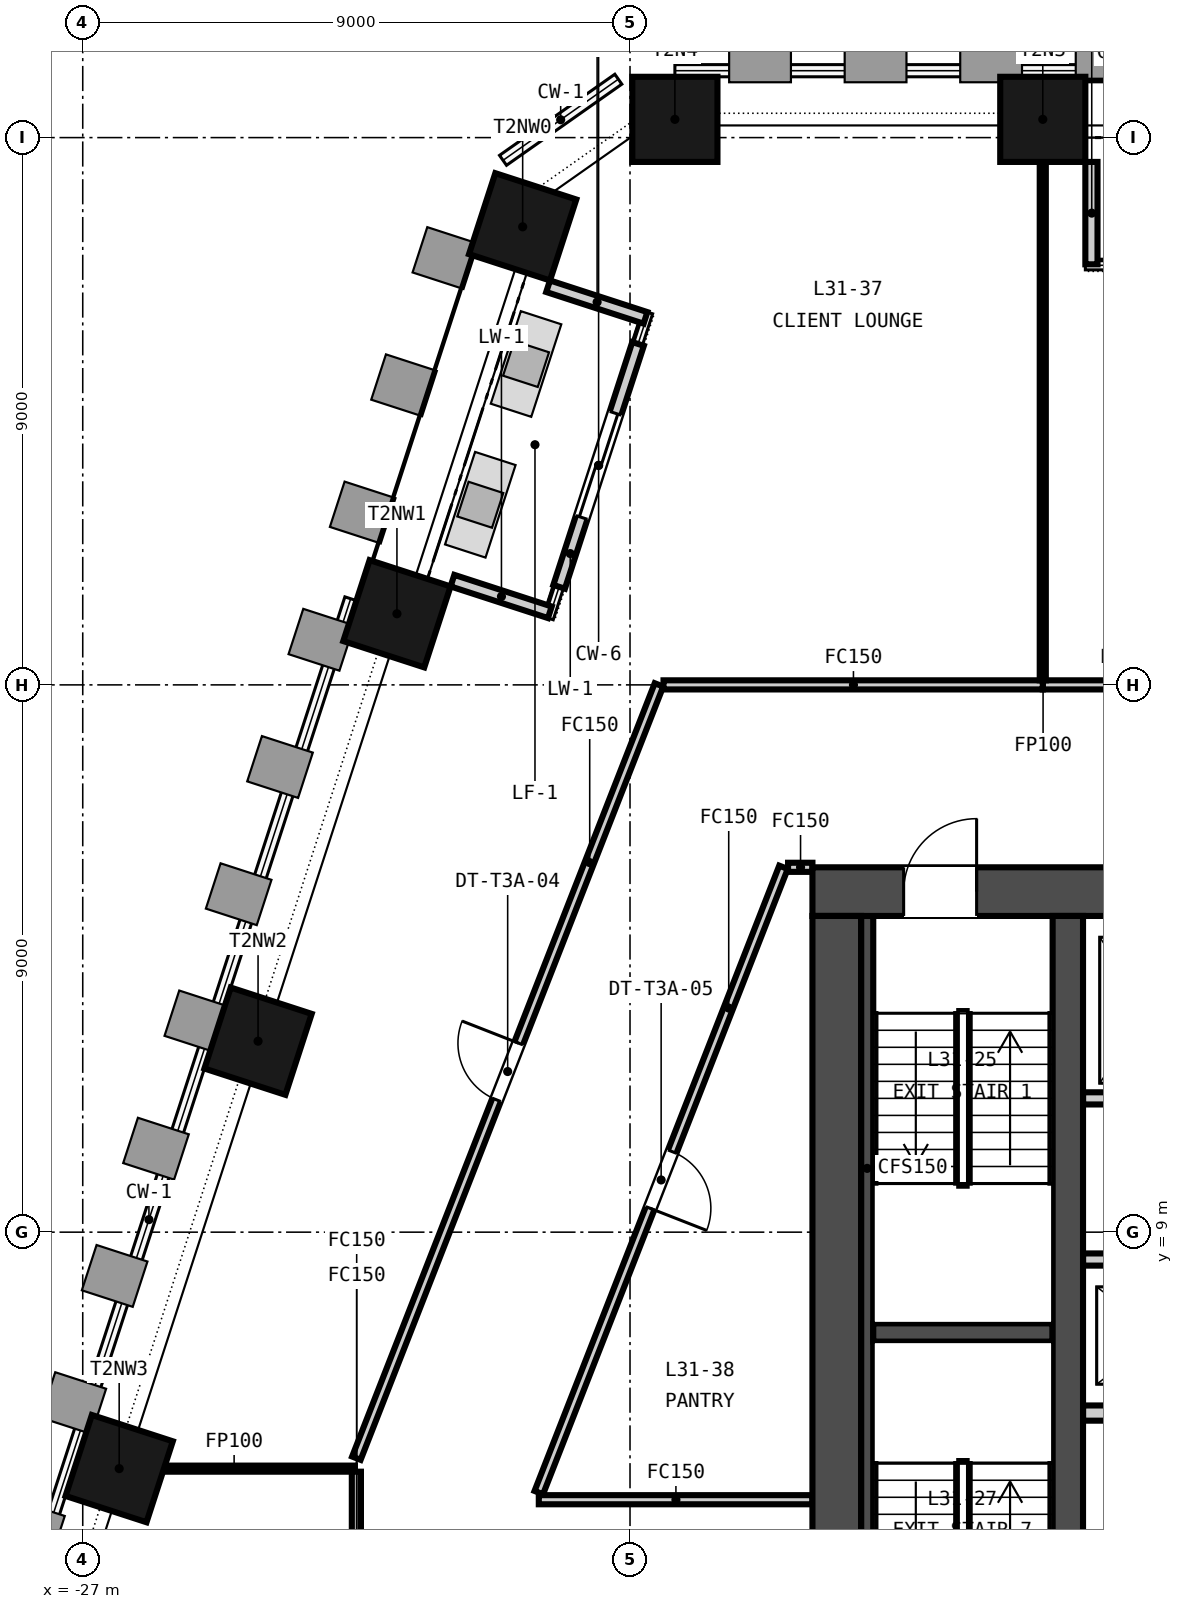
"""IFC4 building model, lengths in metres.
Left out: names, types, materials, properties, quantities, classifications, styles, units other than length and angle.
Written with IfcOpenShell. Run it as: python <this file> out.ifc"""

import sys

from ifc_helpers import new_model, si_unit, direction, frame, frame_2d, origin, origin_2d, place, context, subcontext, project, spatial, rectangle, extrude, element, fill, save


model = new_model("IFC4")
c1 = context("Model", 3, precision=1e-05, world=origin(), true_north=direction((0.0, 1.0)))
c2 = subcontext(c1, "Body", "Model", "MODEL_VIEW")
j1 = project(units=[si_unit("LENGTHUNIT", "METRE"), si_unit("PLANEANGLEUNIT", "RADIAN")], contexts=[c1])
p1 = place(None, origin())
s1 = spatial("IfcSite", under=j1, at=p1, CompositionType="ELEMENT")
p2 = place(p1, origin())
s2 = spatial("IfcBuilding", under=s1, at=p2, CompositionType="ELEMENT")
p3 = place(p2, frame((0.0, 0.0, 129.8)))
s3 = spatial("IfcBuildingStorey", under=s2, at=p3, CompositionType="ELEMENT", Elevation=129.8)
p4 = place(p3, frame((-15.0, 14.6, -0.15), z_axis=(0.0, 0.0, 1.0), x_axis=(1.0, 0.0, 0.0)))
e1 = element("IfcWall", 1, at=p4, inside=s3, PredefinedType="SOLIDWALL", context=c2, shape_type="SweptSolid", body=[
    extrude(rectangle(XDim=30.0, YDim=0.8, at=frame_2d((15.0, 0.0))), origin(), (0.0, 0.0, 1.0), 3.65),
])
p5 = place(p4, frame((9.25, 0.0, 0.15)))
e2 = element("IfcOpeningElement", 2, at=p5, cuts=e1, PredefinedType="OPENING", context=c2, shape_type="SweptSolid", body=[
    extrude(rectangle(XDim=1.5, YDim=2.1, at=frame_2d((0.75, 1.05))), frame((0.0, 0.41, 0.0), z_axis=(0.0, -1.0, 0.0), x_axis=(1.0, 0.0, 0.0)), (0.0, 0.0, 1.0), 0.82),
])
p6 = place(p4, frame((19.4, 0.0, 0.15)))
e3 = element("IfcOpeningElement", 3, at=p6, cuts=e1, PredefinedType="OPENING", context=c2, shape_type="SweptSolid", body=[
    extrude(rectangle(XDim=1.5, YDim=2.1, at=frame_2d((0.75, 1.05))), frame((0.0, 0.41, 0.0), z_axis=(0.0, -1.0, 0.0), x_axis=(1.0, 0.0, 0.0)), (0.0, 0.0, 1.0), 0.82),
])
p7 = place(p4, frame((1.5, 0.0, 0.15)))
e4 = element("IfcOpeningElement", 4, at=p7, cuts=e1, PredefinedType="OPENING", context=c2, shape_type="SweptSolid", body=[
    extrude(rectangle(XDim=1.2, YDim=2.1, at=frame_2d((0.6, 1.05))), frame((0.0, 0.41, 0.0), z_axis=(0.0, -1.0, 0.0), x_axis=(1.0, 0.0, 0.0)), (0.0, 0.0, 1.0), 0.82),
])
p8 = place(p4, frame((27.3, 0.0, 0.15)))
e5 = element("IfcOpeningElement", 5, at=p8, cuts=e1, PredefinedType="OPENING", context=c2, shape_type="SweptSolid", body=[
    extrude(rectangle(XDim=1.2, YDim=2.1, at=frame_2d((0.6, 1.05))), frame((0.0, 0.41, 0.0), z_axis=(0.0, -1.0, 0.0), x_axis=(1.0, 0.0, 0.0)), (0.0, 0.0, 1.0), 0.82),
])
p9 = place(p3, frame((-14.6, 0.8, -0.15), z_axis=(0.0, 0.0, 1.0), x_axis=(0.0, 1.0, 0.0)))
e6 = element("IfcWall", 6, at=p9, inside=s3, PredefinedType="SOLIDWALL", context=c2, shape_type="SweptSolid", body=[
    extrude(rectangle(XDim=13.4, YDim=0.8, at=frame_2d((6.7, 0.0))), origin(), (0.0, 0.0, 1.0), 3.65),
])
p10 = place(p3, frame((-10.8, 0.8, -0.15), z_axis=(0.0, 0.0, 1.0), x_axis=(0.0, 1.0, 0.0)))
e7 = element("IfcWall", 7, at=p10, inside=s3, PredefinedType="SOLIDWALL", context=c2, shape_type="SweptSolid", body=[
    extrude(rectangle(XDim=13.4, YDim=0.5, at=frame_2d((6.7, 0.0))), origin(), (0.0, 0.0, 1.0), 3.65),
])
for number, where, z_axis, x_axis in (
    (8, (-11.212, 27.3, -0.15), (0.0, 0.0, 1.0), (-1.0, 0.0, 0.0)),
    (9, (-17.262, 27.3, -0.15), (0.0, 0.0, 1.0), (-1.0, 0.0, 0.0)),
    (10, (-19.765, 25.533, -0.15), (0.0, 0.0, 1.0), (-0.309, -0.951, 0.0)),
    (11, (-21.833, 19.17, -0.15), (0.0, 0.0, 1.0), (-0.309, -0.951, 0.0)),
    (12, (-24.117, 12.141, -0.15), (0.0, 0.0, 1.0), (-0.309, -0.951, 0.0)),
    (13, (-26.401, 5.111, -0.15), (0.0, 0.0, 1.0), (-0.309, -0.951, 0.0)),
):
    element("IfcColumn", number, at=place(p3, frame(where, z_axis=z_axis, x_axis=x_axis)), inside=s3, PredefinedType="COLUMN", context=c2, shape_type="SweptSolid", body=[
        extrude(rectangle(XDim=1.4, YDim=1.4, at=origin_2d()), origin(), (0.0, 0.0, 1.0), 3.65),
    ])
p11 = place(p3, frame((-10.412, 26.6, 0.0), z_axis=(0.0, 0.0, 1.0), x_axis=(0.0, -1.0, 0.0)))
e14 = element("IfcWall", 14, at=p11, inside=s3, PredefinedType="SOLIDWALL", context=c2, shape_type="SweptSolid", body=[
    extrude(rectangle(XDim=1.684, YDim=0.2, at=frame_2d((0.842, 0.0))), origin(), (0.0, 0.0, 1.0), 3.05),
])
p12 = place(p3, frame((-17.868, 23.607, 0.0), z_axis=(0.0, 0.0, 1.0), x_axis=(-0.308999325213, -0.951062257173, 0.0)))
e15 = element("IfcWall", 15, at=p12, inside=s3, PredefinedType="SOLIDWALL", context=c2, shape_type="SweptSolid", body=[
    extrude(rectangle(XDim=4.2, YDim=0.2, at=frame_2d((2.1, 0.0))), origin(), (0.0, 0.0, 1.0), 3.05),
])
p13 = place(p12, frame((1.2, 0.0, 0.0)))
e16 = element("IfcOpeningElement", 16, at=p13, cuts=e15, PredefinedType="OPENING", context=c2, shape_type="SweptSolid", body=[
    extrude(rectangle(XDim=1.8, YDim=2.4, at=frame_2d((0.9, 1.2))), frame((0.0, 0.11, 0.0), z_axis=(0.0, -1.0, 0.0), x_axis=(1.0, 0.0, 0.0)), (0.0, 0.0, 1.0), 0.22),
])
p14 = place(p3, frame((-19.347, 24.556, 0.0), z_axis=(0.0, 0.0, 1.0), x_axis=(0.951076677115, -0.308954938862, 0.0)))
e17 = element("IfcWall", 17, at=p14, inside=s3, PredefinedType="SOLIDWALL", context=c2, shape_type="SweptSolid", body=[
    extrude(rectangle(XDim=1.684, YDim=0.2, at=frame_2d((0.842, 0.0))), origin(), (0.0, 0.0, 1.0), 3.05),
])
p15 = place(p3, frame((-20.92, 19.714, 0.0), z_axis=(0.0, 0.0, 1.0), x_axis=(0.951034068731, -0.309086072338, 0.0)))
e18 = element("IfcWall", 18, at=p15, inside=s3, PredefinedType="SOLIDWALL", context=c2, shape_type="SweptSolid", body=[
    extrude(rectangle(XDim=1.684, YDim=0.2, at=frame_2d((0.842, 0.0))), origin(), (0.0, 0.0, 1.0), 2.897),
])
p16 = place(p3, frame((-10.55, 6.025, 0.0), z_axis=(0.0, 0.0, 1.0), x_axis=(1.0, 0.0, 0.0)))
e19 = element("IfcWall", 19, at=p16, inside=s3, PredefinedType="PARTITIONING", context=c2, shape_type="SweptSolid", body=[
    extrude(rectangle(XDim=21.1, YDim=0.25, at=frame_2d((10.55, 0.0))), origin(), (0.0, 0.0, 1.0), 3.5),
])
p17 = place(p3, frame((-10.55, 8.55, 0.0), z_axis=(0.0, 0.0, 1.0), x_axis=(1.0, 0.0, 0.0)))
e20 = element("IfcWall", 20, at=p17, inside=s3, PredefinedType="PARTITIONING", context=c2, shape_type="SweptSolid", body=[
    extrude(rectangle(XDim=21.1, YDim=0.2, at=frame_2d((10.55, 0.0))), origin(), (0.0, 0.0, 1.0), 3.5),
])
p18 = place(p17, frame((0.675, 0.0, 0.0)))
e21 = element("IfcOpeningElement", 21, at=p18, cuts=e20, PredefinedType="OPENING", context=c2, shape_type="SweptSolid", body=[
    extrude(rectangle(XDim=1.2, YDim=2.1, at=frame_2d((0.6, 1.05))), frame((0.0, 0.11, 0.0), z_axis=(0.0, -1.0, 0.0), x_axis=(1.0, 0.0, 0.0)), (0.0, 0.0, 1.0), 0.22),
])
p19 = place(p17, frame((3.475, 0.0, 0.0)))
e22 = element("IfcOpeningElement", 22, at=p19, cuts=e20, PredefinedType="OPENING", context=c2, shape_type="SweptSolid", body=[
    extrude(rectangle(XDim=1.2, YDim=2.1, at=frame_2d((0.6, 1.05))), frame((0.0, 0.11, 0.0), z_axis=(0.0, -1.0, 0.0), x_axis=(1.0, 0.0, 0.0)), (0.0, 0.0, 1.0), 0.22),
])
p20 = place(p17, frame((6.275, 0.0, 0.0)))
e23 = element("IfcOpeningElement", 23, at=p20, cuts=e20, PredefinedType="OPENING", context=c2, shape_type="SweptSolid", body=[
    extrude(rectangle(XDim=1.2, YDim=2.1, at=frame_2d((0.6, 1.05))), frame((0.0, 0.11, 0.0), z_axis=(0.0, -1.0, 0.0), x_axis=(1.0, 0.0, 0.0)), (0.0, 0.0, 1.0), 0.22),
])
p21 = place(p17, frame((9.075, 0.0, 0.0)))
e24 = element("IfcOpeningElement", 24, at=p21, cuts=e20, PredefinedType="OPENING", context=c2, shape_type="SweptSolid", body=[
    extrude(rectangle(XDim=1.2, YDim=2.1, at=frame_2d((0.6, 1.05))), frame((0.0, 0.11, 0.0), z_axis=(0.0, -1.0, 0.0), x_axis=(1.0, 0.0, 0.0)), (0.0, 0.0, 1.0), 0.22),
])
p22 = place(p17, frame((11.875, 0.0, 0.0)))
e25 = element("IfcOpeningElement", 25, at=p22, cuts=e20, PredefinedType="OPENING", context=c2, shape_type="SweptSolid", body=[
    extrude(rectangle(XDim=1.2, YDim=2.1, at=frame_2d((0.6, 1.05))), frame((0.0, 0.11, 0.0), z_axis=(0.0, -1.0, 0.0), x_axis=(1.0, 0.0, 0.0)), (0.0, 0.0, 1.0), 0.22),
])
p23 = place(p17, frame((14.675, 0.0, 0.0)))
e26 = element("IfcOpeningElement", 26, at=p23, cuts=e20, PredefinedType="OPENING", context=c2, shape_type="SweptSolid", body=[
    extrude(rectangle(XDim=1.2, YDim=2.1, at=frame_2d((0.6, 1.05))), frame((0.0, 0.11, 0.0), z_axis=(0.0, -1.0, 0.0), x_axis=(1.0, 0.0, 0.0)), (0.0, 0.0, 1.0), 0.22),
])
p24 = place(p17, frame((17.475, 0.0, 0.0)))
e27 = element("IfcOpeningElement", 27, at=p24, cuts=e20, PredefinedType="OPENING", context=c2, shape_type="SweptSolid", body=[
    extrude(rectangle(XDim=1.2, YDim=2.1, at=frame_2d((0.6, 1.05))), frame((0.0, 0.11, 0.0), z_axis=(0.0, -1.0, 0.0), x_axis=(1.0, 0.0, 0.0)), (0.0, 0.0, 1.0), 0.22),
])
p25 = place(p17, frame((19.9, 0.0, 0.0)))
e28 = element("IfcOpeningElement", 28, at=p25, cuts=e20, PredefinedType="OPENING", context=c2, shape_type="SweptSolid", body=[
    extrude(rectangle(XDim=0.9, YDim=2.1, at=frame_2d((0.45, 1.05))), frame((0.0, 0.11, 0.0), z_axis=(0.0, -1.0, 0.0), x_axis=(1.0, 0.0, 0.0)), (0.0, 0.0, 1.0), 0.22),
])
p26 = place(p3, frame((-10.55, 11.2, 0.0), z_axis=(0.0, 0.0, 1.0), x_axis=(1.0, 0.0, 0.0)))
e29 = element("IfcWall", 29, at=p26, inside=s3, PredefinedType="PARTITIONING", context=c2, shape_type="SweptSolid", body=[
    extrude(rectangle(XDim=4.8, YDim=0.2, at=frame_2d((2.4, 0.0))), origin(), (0.0, 0.0, 1.0), 3.5),
])
p27 = place(p26, frame((0.525, 0.0, 0.0)))
e30 = element("IfcOpeningElement", 30, at=p27, cuts=e29, PredefinedType="OPENING", context=c2, shape_type="SweptSolid", body=[
    extrude(rectangle(XDim=1.1, YDim=2.1, at=frame_2d((0.55, 1.05))), frame((0.0, 0.11, 0.0), z_axis=(0.0, -1.0, 0.0), x_axis=(1.0, 0.0, 0.0)), (0.0, 0.0, 1.0), 0.22),
])
p28 = place(p26, frame((2.925, 0.0, 0.0)))
e31 = element("IfcOpeningElement", 31, at=p28, cuts=e29, PredefinedType="OPENING", context=c2, shape_type="SweptSolid", body=[
    extrude(rectangle(XDim=1.1, YDim=2.1, at=frame_2d((0.55, 1.05))), frame((0.0, 0.11, 0.0), z_axis=(0.0, -1.0, 0.0), x_axis=(1.0, 0.0, 0.0)), (0.0, 0.0, 1.0), 0.22),
])
p29 = place(p3, frame((-14.0, 7.35, 0.0), z_axis=(0.0, 0.0, 1.0), x_axis=(1.0, 0.0, 0.0)))
e32 = element("IfcWall", 32, at=p29, inside=s3, PredefinedType="SOLIDWALL", context=c2, shape_type="SweptSolid", body=[
    extrude(rectangle(XDim=2.95, YDim=0.3, at=frame_2d((1.475, 0.0))), origin(), (0.0, 0.0, 1.0), 3.5),
])
p30 = place(p3, frame((-14.1, 0.8, 0.0), z_axis=(0.0, 0.0, 1.0), x_axis=(0.0, 1.0, 0.0)))
e33 = element("IfcWall", 33, at=p30, inside=s3, PredefinedType="SOLIDWALL", context=c2, shape_type="SweptSolid", body=[
    extrude(rectangle(XDim=13.4, YDim=0.2, at=frame_2d((6.7, 0.0))), origin(), (0.0, 0.0, 1.0), 3.5),
])
p31 = place(p3, frame((-15.476, 15.0, 0.0), z_axis=(0.0, 0.0, 1.0), x_axis=(-0.364411853206, -0.931237886494, 0.0)))
e34 = element("IfcWall", 34, at=p31, inside=s3, PredefinedType="PARTITIONING", context=c2, shape_type="SweptSolid", body=[
    extrude(rectangle(XDim=11.042, YDim=0.15, at=frame_2d((5.521, 0.0))), origin(), (0.0, 0.0, 1.0), 2.741),
])
p32 = place(p31, frame((5.021, 0.0, 0.0)))
e35 = element("IfcOpeningElement", 35, at=p32, cuts=e34, PredefinedType="OPENING", context=c2, shape_type="SweptSolid", body=[
    extrude(rectangle(XDim=1.0, YDim=2.1, at=frame_2d((0.5, 1.05))), frame((0.0, 0.085, 0.0), z_axis=(0.0, -1.0, 0.0), x_axis=(1.0, 0.0, 0.0)), (0.0, 0.0, 1.0), 0.17),
])
p33 = place(p3, frame((-15.0, 15.0, 0.0), z_axis=(0.0, 0.0, 1.0), x_axis=(-1.0, 0.0, 0.0)))
e36 = element("IfcWall", 36, at=p33, inside=s3, PredefinedType="PARTITIONING", context=c2, shape_type="SweptSolid", body=[
    extrude(rectangle(XDim=0.401, YDim=0.15, at=frame_2d((0.2, 0.0))), origin(), (0.0, 0.0, 1.0), 2.741),
])
p34 = place(p3, frame((-11.212, 18.0, 0.0), z_axis=(0.0, 0.0, 1.0), x_axis=(1.0, 0.0, 0.0)))
e37 = element("IfcWall", 37, at=p34, inside=s3, PredefinedType="PARTITIONING", context=c2, shape_type="SweptSolid", body=[
    extrude(rectangle(XDim=6.75, YDim=0.15, at=frame_2d((3.375, 0.0))), origin(), (0.0, 0.0, 1.0), 2.741),
])
p35 = place(p34, frame((2.875, 0.0, 0.0)))
e38 = element("IfcOpeningElement", 38, at=p35, cuts=e37, PredefinedType="OPENING", context=c2, shape_type="SweptSolid", body=[
    extrude(rectangle(XDim=1.0, YDim=2.1, at=frame_2d((0.5, 1.05))), frame((0.0, 0.085, 0.0), z_axis=(0.0, -1.0, 0.0), x_axis=(1.0, 0.0, 0.0)), (0.0, 0.0, 1.0), 0.17),
])
p36 = place(p3, frame((-22.5, 5.283, 0.0), z_axis=(0.0, 0.0, 1.0), x_axis=(0.364389237236, 0.931246736256, 0.0)))
e39 = element("IfcWall", 39, at=p36, inside=s3, PredefinedType="PARTITIONING", context=c2, shape_type="SweptSolid", body=[
    extrude(rectangle(XDim=13.656, YDim=0.15, at=frame_2d((6.828, 0.0))), origin(), (0.0, 0.0, 1.0), 2.741),
])
p37 = place(p36, frame((6.328, 0.0, 0.0)))
e40 = element("IfcOpeningElement", 40, at=p37, cuts=e39, PredefinedType="OPENING", context=c2, shape_type="SweptSolid", body=[
    extrude(rectangle(XDim=1.0, YDim=2.1, at=frame_2d((0.5, 1.05))), frame((0.0, 0.085, 0.0), z_axis=(0.0, -1.0, 0.0), x_axis=(1.0, 0.0, 0.0)), (0.0, 0.0, 1.0), 0.17),
])
p38 = place(p3, frame((-17.449, 18.0, 0.0), z_axis=(0.0, 0.0, 1.0), x_axis=(1.0, 0.0, 0.0)))
e41 = element("IfcWall", 41, at=p38, inside=s3, PredefinedType="PARTITIONING", context=c2, shape_type="SweptSolid", body=[
    extrude(rectangle(XDim=6.237, YDim=0.15, at=frame_2d((3.119, 0.0))), origin(), (0.0, 0.0, 1.0), 2.741),
])
p39 = place(p3, frame((-11.212, 18.075, 0.0), z_axis=(0.0, 0.0, 1.0), x_axis=(0.0, 1.0, 0.0)))
e42 = element("IfcWall", 42, at=p39, inside=s3, PredefinedType="PARTITIONING", context=c2, shape_type="SweptSolid", body=[
    extrude(rectangle(XDim=9.325, YDim=0.1, at=frame_2d((4.663, 0.0))), origin(), (0.0, 0.0, 1.0), 2.741),
])
p40 = place(p3, frame((-26.506, 5.111, 0.0), z_axis=(0.0, 0.0, 1.0), x_axis=(1.0, 0.0, 0.0)))
e43 = element("IfcWall", 43, at=p40, inside=s3, PredefinedType="PARTITIONING", context=c2, shape_type="SweptSolid", body=[
    extrude(rectangle(XDim=3.981, YDim=0.1, at=frame_2d((1.991, 0.0))), origin(), (0.0, 0.0, 1.0), 2.741),
])
p41 = place(p3, frame((-19.5, 4.6, 0.0), z_axis=(0.0, 0.0, 1.0), x_axis=(1.0, 0.0, 0.0)))
e44 = element("IfcWall", 44, at=p41, inside=s3, PredefinedType="PARTITIONING", context=c2, shape_type="SweptSolid", body=[
    extrude(rectangle(XDim=4.5, YDim=0.15, at=frame_2d((2.25, 0.0))), origin(), (0.0, 0.0, 1.0), 2.741),
])
p42 = place(p3, frame((-22.5, 0.0, 0.0), z_axis=(0.0, 0.0, 1.0), x_axis=(0.0, 1.0, 0.0)))
e45 = element("IfcWall", 45, at=p42, inside=s3, PredefinedType="PARTITIONING", context=c2, shape_type="SweptSolid", body=[
    extrude(rectangle(XDim=5.061, YDim=0.15, at=frame_2d((2.531, 0.0))), origin(), (0.0, 0.0, 1.0), 2.741),
])
p43 = place(p13, origin())
e46 = element("IfcDoor", 46, at=p43, inside=s3, OperationType="SINGLE_SWING_LEFT", PredefinedType="DOOR", context=c2, shape_type="SweptSolid", body=[
    extrude(rectangle(XDim=1.8, YDim=2.4, at=frame_2d((0.9, 1.2))), frame((0.0, 0.025, 0.0), z_axis=(0.0, -1.0, 0.0), x_axis=(1.0, 0.0, 0.0)), (0.0, 0.0, 1.0), 0.05),
])
fill(e16, e46)
p44 = place(p7, origin())
e47 = element("IfcDoor", 47, at=p44, inside=s3, OperationType="SINGLE_SWING_RIGHT", PredefinedType="DOOR", context=c2, shape_type="SweptSolid", body=[
    extrude(rectangle(XDim=1.2, YDim=2.1, at=frame_2d((0.6, 1.05))), frame((0.0, 0.025, 0.0), z_axis=(0.0, -1.0, 0.0), x_axis=(1.0, 0.0, 0.0)), (0.0, 0.0, 1.0), 0.05),
])
fill(e4, e47)
p45 = place(p37, origin())
e48 = element("IfcDoor", 48, at=p45, inside=s3, OperationType="SINGLE_SWING_RIGHT", PredefinedType="DOOR", context=c2, shape_type="SweptSolid", body=[
    extrude(rectangle(XDim=1.0, YDim=2.1, at=frame_2d((0.5, 1.05))), frame((0.0, 0.025, 0.0), z_axis=(0.0, -1.0, 0.0), x_axis=(1.0, 0.0, 0.0)), (0.0, 0.0, 1.0), 0.05),
])
fill(e40, e48)
p46 = place(p32, origin())
e49 = element("IfcDoor", 49, at=p46, inside=s3, OperationType="SINGLE_SWING_RIGHT", PredefinedType="DOOR", context=c2, shape_type="SweptSolid", body=[
    extrude(rectangle(XDim=1.0, YDim=2.1, at=frame_2d((0.5, 1.05))), frame((0.0, 0.025, 0.0), z_axis=(0.0, -1.0, 0.0), x_axis=(1.0, 0.0, 0.0)), (0.0, 0.0, 1.0), 0.05),
])
fill(e35, e49)
save(model, sys.argv[1])
